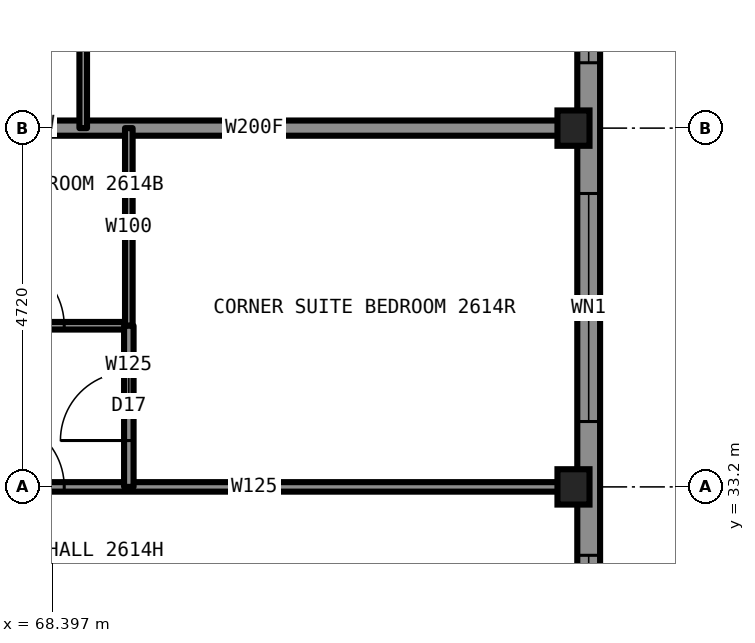
"""IFC4 building model, lengths in metres.
Left out: names, types, materials, properties, quantities, classifications, styles, units other than length and angle.
Written with IfcOpenShell. Run it as: python <this file> out.ifc"""

import sys

from ifc_helpers import new_model, si_unit, direction, frame, frame_2d, origin, origin_2d, place, context, subcontext, project, spatial, rectangle, i_section, extrude, element, fill, save


model = new_model("IFC4")
c1 = context("Model", 3, precision=1e-05, world=origin(), true_north=direction((0.0, 1.0)))
c2 = subcontext(c1, "Body", "Model", "MODEL_VIEW")
j1 = project(units=[si_unit("LENGTHUNIT", "METRE"), si_unit("PLANEANGLEUNIT", "RADIAN")], contexts=[c1])
p1 = place(None, origin())
s1 = spatial("IfcSite", under=j1, at=p1, CompositionType="ELEMENT")
p2 = place(p1, origin())
s2 = spatial("IfcBuilding", under=s1, at=p2, CompositionType="ELEMENT")
p3 = place(p2, frame((0.0, 0.0, 93.4)))
s3 = spatial("IfcBuildingStorey", under=s2, at=p3, CompositionType="ELEMENT", Elevation=93.4)
for number, where, z_axis, x_axis in (
    (1, (75.25, 33.2, 0.0), (0.0, 0.0, 1.0), (1.0, 0.0, 0.0)),
    (2, (75.25, 37.92, 0.0), (0.0, 0.0, 1.0), (1.0, 0.0, 0.0)),
):
    element("IfcColumn", number, at=place(p3, frame(where, z_axis=z_axis, x_axis=x_axis)), inside=s3, PredefinedType="COLUMN", context=c2, shape_type="SweptSolid", body=[
        extrude(i_section(OverallWidth=0.442, OverallDepth=0.531, WebThickness=0.066, FlangeThickness=0.106, at=origin_2d()), origin(), (0.0, 0.0, 1.0), 3.5),
    ])
p4 = place(p3, frame((66.8, 33.2, 0.0), z_axis=(0.0, 0.0, 1.0), x_axis=(1.0, 0.0, 0.0)))
e3 = element("IfcWall", 3, at=p4, inside=s3, PredefinedType="PARTITIONING", context=c2, shape_type="SweptSolid", body=[
    extrude(rectangle(XDim=8.5, YDim=0.125, at=frame_2d((4.25, 0.0))), origin(), (0.0, 0.0, 1.0), 2.573),
])
p5 = place(p4, frame((0.85, 0.0, 0.0)))
e4 = element("IfcOpeningElement", 4, at=p5, cuts=e3, PredefinedType="OPENING", context=c2, shape_type="SweptSolid", body=[
    extrude(rectangle(XDim=0.9, YDim=2.2, at=frame_2d((0.45, 1.1))), frame((0.0, 0.073, 0.0), z_axis=(0.0, -1.0, 0.0), x_axis=(1.0, 0.0, 0.0)), (0.0, 0.0, 1.0), 0.145),
])
p6 = place(p3, frame((66.8, 37.92, 0.0), z_axis=(0.0, 0.0, 1.0), x_axis=(1.0, 0.0, 0.0)))
e5 = element("IfcWall", 5, at=p6, inside=s3, PredefinedType="PARTITIONING", context=c2, shape_type="SweptSolid", body=[
    extrude(rectangle(XDim=8.5, YDim=0.2, at=frame_2d((4.25, 0.0))), origin(), (0.0, 0.0, 1.0), 2.573),
])
p7 = place(p3, frame((66.8, 35.32, 0.0), z_axis=(0.0, 0.0, 1.0), x_axis=(1.0, 0.0, 0.0)))
e6 = element("IfcWall", 6, at=p7, inside=s3, PredefinedType="PARTITIONING", context=c2, shape_type="SweptSolid", body=[
    extrude(rectangle(XDim=2.6, YDim=0.1, at=frame_2d((1.3, 0.0))), origin(), (0.0, 0.0, 1.0), 3.33),
])
p8 = place(p7, frame((0.85, 0.0, 0.0)))
e7 = element("IfcOpeningElement", 7, at=p8, cuts=e6, PredefinedType="OPENING", context=c2, shape_type="SweptSolid", body=[
    extrude(rectangle(XDim=0.9, YDim=2.1, at=frame_2d((0.45, 1.05))), frame((0.0, 0.06, 0.0), z_axis=(0.0, -1.0, 0.0), x_axis=(1.0, 0.0, 0.0)), (0.0, 0.0, 1.0), 0.12),
])
p9 = place(p3, frame((68.8, 37.92, 0.0), z_axis=(0.0, 0.0, 1.0), x_axis=(0.0, 1.0, 0.0)))
e8 = element("IfcWall", 8, at=p9, inside=s3, PredefinedType="PARTITIONING", context=c2, shape_type="SweptSolid", body=[
    extrude(rectangle(XDim=1.2, YDim=0.1, at=frame_2d((0.6, 0.0))), origin(), (0.0, 0.0, 1.0), 3.33),
])
p10 = place(p3, frame((69.4, 35.32, 0.0), z_axis=(0.0, 0.0, 1.0), x_axis=(0.0, 1.0, 0.0)))
e9 = element("IfcWall", 9, at=p10, inside=s3, PredefinedType="PARTITIONING", context=c2, shape_type="SweptSolid", body=[
    extrude(rectangle(XDim=2.6, YDim=0.1, at=frame_2d((1.3, 0.0))), origin(), (0.0, 0.0, 1.0), 3.33),
])
p11 = place(p3, frame((69.4, 33.2, 0.0), z_axis=(0.0, 0.0, 1.0), x_axis=(0.0, 1.0, 0.0)))
e10 = element("IfcWall", 10, at=p11, inside=s3, PredefinedType="PARTITIONING", context=c2, shape_type="SweptSolid", body=[
    extrude(rectangle(XDim=2.12, YDim=0.125, at=frame_2d((1.06, 0.0))), origin(), (0.0, 0.0, 1.0), 3.33),
])
p12 = place(p11, frame((0.61, 0.0, 0.0)))
e11 = element("IfcOpeningElement", 11, at=p12, cuts=e10, PredefinedType="OPENING", context=c2, shape_type="SweptSolid", body=[
    extrude(rectangle(XDim=0.9, YDim=2.2, at=frame_2d((0.45, 1.1))), frame((0.0, 0.073, 0.0), z_axis=(0.0, -1.0, 0.0), x_axis=(1.0, 0.0, 0.0)), (0.0, 0.0, 1.0), 0.145),
])
p13 = place(p3, frame((75.45, 29.9, 0.0), z_axis=(0.0, 0.0, 1.0), x_axis=(0.0, 1.0, 0.0)))
e12 = element("IfcWall", 12, at=p13, inside=s3, PredefinedType="SOLIDWALL", context=c2, shape_type="SweptSolid", body=[
    extrude(rectangle(XDim=30.2, YDim=0.3, at=frame_2d((15.1, 0.0))), origin(), (0.0, 0.0, 1.0), 2.83),
])
p14 = place(p13, frame((0.85, 0.0, 0.5)))
e13 = element("IfcOpeningElement", 13, at=p14, cuts=e12, PredefinedType="OPENING", context=c2, shape_type="SweptSolid", body=[
    extrude(rectangle(XDim=1.6, YDim=2.0, at=frame_2d((0.8, 1.0))), frame((0.0, 0.16, 0.0), z_axis=(0.0, -1.0, 0.0), x_axis=(1.0, 0.0, 0.0)), (0.0, 0.0, 1.0), 0.32),
])
p15 = place(p13, frame((4.16, 0.0, 0.5)))
e14 = element("IfcOpeningElement", 14, at=p15, cuts=e12, PredefinedType="OPENING", context=c2, shape_type="SweptSolid", body=[
    extrude(rectangle(XDim=3.0, YDim=2.0, at=frame_2d((1.5, 1.0))), frame((0.0, 0.16, 0.0), z_axis=(0.0, -1.0, 0.0), x_axis=(1.0, 0.0, 0.0)), (0.0, 0.0, 1.0), 0.32),
])
p16 = place(p13, frame((8.88, 0.0, 0.5)))
e15 = element("IfcOpeningElement", 15, at=p16, cuts=e12, PredefinedType="OPENING", context=c2, shape_type="SweptSolid", body=[
    extrude(rectangle(XDim=3.0, YDim=2.0, at=frame_2d((1.5, 1.0))), frame((0.0, 0.16, 0.0), z_axis=(0.0, -1.0, 0.0), x_axis=(1.0, 0.0, 0.0)), (0.0, 0.0, 1.0), 0.32),
])
p17 = place(p13, frame((13.6, 0.0, 0.5)))
e16 = element("IfcOpeningElement", 16, at=p17, cuts=e12, PredefinedType="OPENING", context=c2, shape_type="SweptSolid", body=[
    extrude(rectangle(XDim=3.0, YDim=2.0, at=frame_2d((1.5, 1.0))), frame((0.0, 0.16, 0.0), z_axis=(0.0, -1.0, 0.0), x_axis=(1.0, 0.0, 0.0)), (0.0, 0.0, 1.0), 0.32),
])
p18 = place(p13, frame((18.32, 0.0, 0.5)))
e17 = element("IfcOpeningElement", 17, at=p18, cuts=e12, PredefinedType="OPENING", context=c2, shape_type="SweptSolid", body=[
    extrude(rectangle(XDim=3.0, YDim=2.0, at=frame_2d((1.5, 1.0))), frame((0.0, 0.16, 0.0), z_axis=(0.0, -1.0, 0.0), x_axis=(1.0, 0.0, 0.0)), (0.0, 0.0, 1.0), 0.32),
])
p19 = place(p13, frame((23.04, 0.0, 0.5)))
e18 = element("IfcOpeningElement", 18, at=p19, cuts=e12, PredefinedType="OPENING", context=c2, shape_type="SweptSolid", body=[
    extrude(rectangle(XDim=3.0, YDim=2.0, at=frame_2d((1.5, 1.0))), frame((0.0, 0.16, 0.0), z_axis=(0.0, -1.0, 0.0), x_axis=(1.0, 0.0, 0.0)), (0.0, 0.0, 1.0), 0.32),
])
p20 = place(p13, frame((27.75, 0.0, 0.5)))
e19 = element("IfcOpeningElement", 19, at=p20, cuts=e12, PredefinedType="OPENING", context=c2, shape_type="SweptSolid", body=[
    extrude(rectangle(XDim=1.6, YDim=2.0, at=frame_2d((0.8, 1.0))), frame((0.0, 0.16, 0.0), z_axis=(0.0, -1.0, 0.0), x_axis=(1.0, 0.0, 0.0)), (0.0, 0.0, 1.0), 0.32),
])
p21 = place(p5, origin())
e20 = element("IfcDoor", 20, at=p21, inside=s3, OperationType="SINGLE_SWING_LEFT", PredefinedType="DOOR", context=c2, shape_type="SweptSolid", body=[
    extrude(rectangle(XDim=0.9, YDim=2.2, at=frame_2d((0.45, 1.1))), frame((0.0, 0.025, 0.0), z_axis=(0.0, -1.0, 0.0), x_axis=(1.0, 0.0, 0.0)), (0.0, 0.0, 1.0), 0.05),
])
fill(e4, e20)
p22 = place(p8, origin())
e21 = element("IfcDoor", 21, at=p22, inside=s3, OperationType="SINGLE_SWING_RIGHT", PredefinedType="DOOR", context=c2, shape_type="SweptSolid", body=[
    extrude(rectangle(XDim=0.9, YDim=2.1, at=frame_2d((0.45, 1.05))), frame((0.0, 0.025, 0.0), z_axis=(0.0, -1.0, 0.0), x_axis=(1.0, 0.0, 0.0)), (0.0, 0.0, 1.0), 0.05),
])
fill(e7, e21)
p23 = place(p12, origin())
e22 = element("IfcDoor", 22, at=p23, inside=s3, OperationType="SINGLE_SWING_LEFT", PredefinedType="DOOR", context=c2, shape_type="SweptSolid", body=[
    extrude(rectangle(XDim=0.9, YDim=2.2, at=frame_2d((0.45, 1.1))), frame((0.0, 0.025, 0.0), z_axis=(0.0, -1.0, 0.0), x_axis=(1.0, 0.0, 0.0)), (0.0, 0.0, 1.0), 0.05),
])
fill(e11, e22)
p24 = place(p14, origin())
e23 = element("IfcWindow", 23, at=p24, inside=s3, PartitioningType="SINGLE_PANEL", PredefinedType="WINDOW", context=c2, shape_type="SweptSolid", body=[
    extrude(rectangle(XDim=1.6, YDim=2.0, at=frame_2d((0.8, 1.0))), frame((0.0, 0.03, 0.0), z_axis=(0.0, -1.0, 0.0), x_axis=(1.0, 0.0, 0.0)), (0.0, 0.0, 1.0), 0.06),
])
fill(e13, e23)
p25 = place(p15, origin())
e24 = element("IfcWindow", 24, at=p25, inside=s3, PartitioningType="SINGLE_PANEL", PredefinedType="WINDOW", context=c2, shape_type="SweptSolid", body=[
    extrude(rectangle(XDim=3.0, YDim=2.0, at=frame_2d((1.5, 1.0))), frame((0.0, 0.03, 0.0), z_axis=(0.0, -1.0, 0.0), x_axis=(1.0, 0.0, 0.0)), (0.0, 0.0, 1.0), 0.06),
])
fill(e14, e24)
p26 = place(p16, origin())
e25 = element("IfcWindow", 25, at=p26, inside=s3, PartitioningType="SINGLE_PANEL", PredefinedType="WINDOW", context=c2, shape_type="SweptSolid", body=[
    extrude(rectangle(XDim=3.0, YDim=2.0, at=frame_2d((1.5, 1.0))), frame((0.0, 0.03, 0.0), z_axis=(0.0, -1.0, 0.0), x_axis=(1.0, 0.0, 0.0)), (0.0, 0.0, 1.0), 0.06),
])
fill(e15, e25)
save(model, sys.argv[1])
